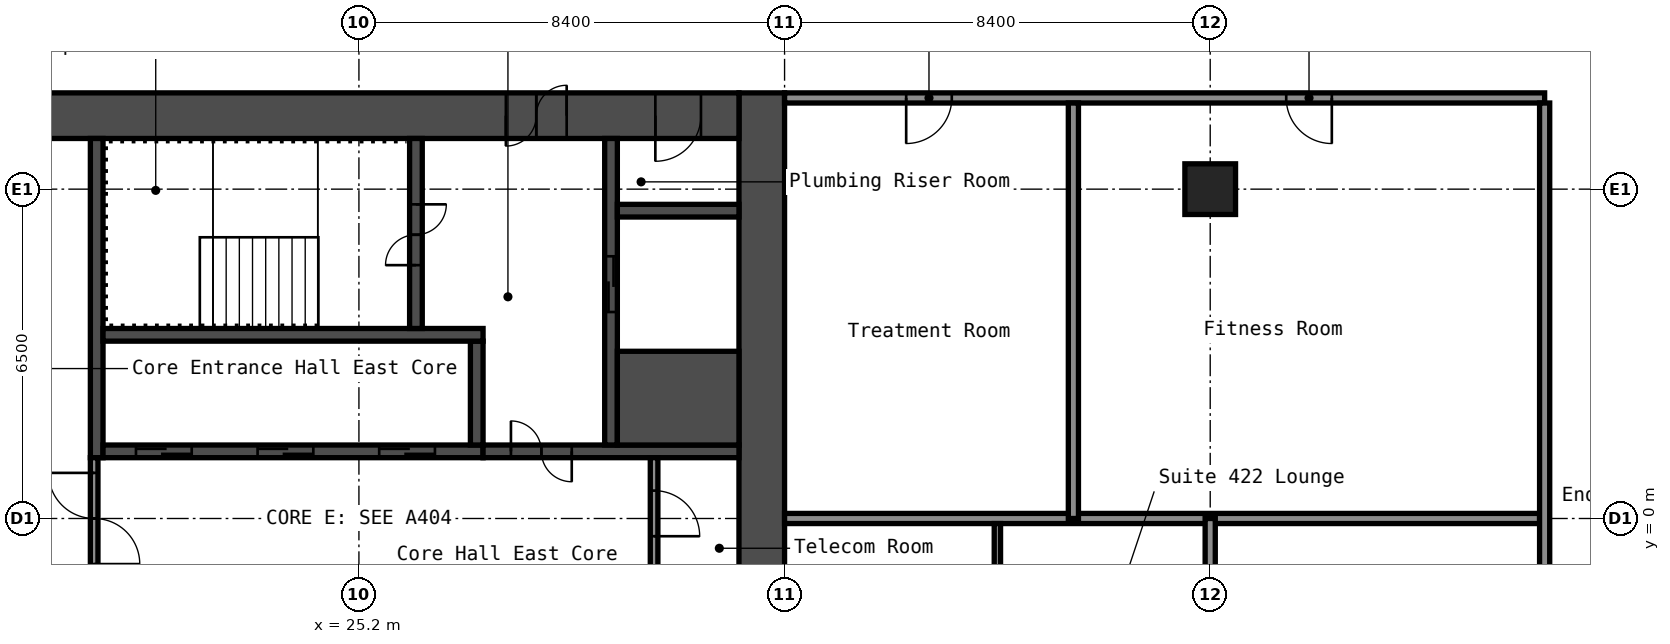
"""IFC4 building model, lengths in metres.
Left out: names, types, materials, properties, quantities, classifications, styles, units other than length and angle.
Written with IfcOpenShell. Run it as: python <this file> out.ifc"""

import sys

from ifc_helpers import new_model, si_unit, direction, frame, frame_2d, origin, origin_2d, place, context, subcontext, project, spatial, rectangle, hollow_rectangle, extrude, element, fill, save


model = new_model("IFC4")
c1 = context("Model", 3, precision=1e-05, world=origin(), true_north=direction((0.0, 1.0)))
c2 = subcontext(c1, "Body", "Model", "MODEL_VIEW")
j1 = project(units=[si_unit("LENGTHUNIT", "METRE"), si_unit("PLANEANGLEUNIT", "RADIAN")], contexts=[c1])
p1 = place(None, origin())
s1 = spatial("IfcSite", under=j1, at=p1, CompositionType="ELEMENT")
p2 = place(p1, origin())
s2 = spatial("IfcBuilding", under=s1, at=p2, CompositionType="ELEMENT")
p3 = place(p2, frame((0.0, 0.0, 19.8)))
s3 = spatial("IfcBuildingStorey", under=s2, at=p3, CompositionType="ELEMENT", Elevation=19.8)
p4 = place(p3, frame((42.0, 6.5, 0.0), z_axis=(0.0, 0.0, 1.0), x_axis=(1.0, 0.0, 0.0)))
e1 = element("IfcColumn", 1, at=p4, inside=s3, PredefinedType="COLUMN", context=c2, shape_type="SweptSolid", body=[
    extrude(hollow_rectangle(XDim=1.0, YDim=1.0, WallThickness=0.04, at=origin_2d()), origin(), (0.0, 0.0, 1.0), 2.8),
])
p5 = place(p3, frame((33.15, -8.4, 0.0), z_axis=(0.0, 0.0, 1.0), x_axis=(0.0, 1.0, 0.0)))
e2 = element("IfcWall", 2, at=p5, inside=s3, PredefinedType="SHEAR", context=c2, shape_type="SweptSolid", body=[
    extrude(rectangle(XDim=16.8, YDim=0.9, at=frame_2d((8.4, 0.0))), origin(), (0.0, 0.0, 1.0), 2.8),
])
p6 = place(p3, frame((17.7, 7.95, 0.0), z_axis=(0.0, 0.0, 1.0), x_axis=(1.0, 0.0, 0.0)))
e3 = element("IfcWall", 3, at=p6, inside=s3, PredefinedType="SHEAR", context=c2, shape_type="SweptSolid", body=[
    extrude(rectangle(XDim=15.0, YDim=0.9, at=frame_2d((7.5, 0.0))), origin(), (0.0, 0.0, 1.0), 2.8),
])
p7 = place(p6, frame((10.4, 0.0, 0.0)))
e4 = element("IfcOpeningElement", 4, at=p7, cuts=e3, PredefinedType="OPENING", context=c2, shape_type="SweptSolid", body=[
    extrude(rectangle(XDim=1.2, YDim=2.1, at=frame_2d((0.6, 1.05))), frame((0.0, 0.46, 0.0), z_axis=(0.0, -1.0, 0.0), x_axis=(1.0, 0.0, 0.0)), (0.0, 0.0, 1.0), 0.92),
])
p8 = place(p6, frame((13.35, 0.0, 0.0)))
e5 = element("IfcOpeningElement", 5, at=p8, cuts=e3, PredefinedType="OPENING", context=c2, shape_type="SweptSolid", body=[
    extrude(rectangle(XDim=0.9, YDim=2.1, at=frame_2d((0.45, 1.05))), frame((0.0, 0.46, 0.0), z_axis=(0.0, -1.0, 0.0), x_axis=(1.0, 0.0, 0.0)), (0.0, 0.0, 1.0), 0.92),
])
p9 = place(p3, frame((20.025, 1.2, 0.0), z_axis=(0.0, 0.0, 1.0), x_axis=(0.0, 1.0, 0.0)))
e6 = element("IfcWall", 6, at=p9, inside=s3, PredefinedType="SHEAR", context=c2, shape_type="SweptSolid", body=[
    extrude(rectangle(XDim=6.3, YDim=0.25, at=frame_2d((3.15, 0.0))), origin(), (0.0, 0.0, 1.0), 2.8),
])
p10 = place(p3, frame((20.15, 1.325, 0.0), z_axis=(0.0, 0.0, 1.0), x_axis=(1.0, 0.0, 0.0)))
e7 = element("IfcWall", 7, at=p10, inside=s3, PredefinedType="SHEAR", context=c2, shape_type="SweptSolid", body=[
    extrude(rectangle(XDim=7.5, YDim=0.25, at=frame_2d((3.75, 0.0))), origin(), (0.0, 0.0, 1.0), 2.8),
])
p11 = place(p10, frame((0.65, 0.0, 0.0)))
e8 = element("IfcOpeningElement", 8, at=p11, cuts=e7, PredefinedType="OPENING", context=c2, shape_type="SweptSolid", body=[
    extrude(rectangle(XDim=1.1, YDim=2.1, at=frame_2d((0.55, 1.05))), frame((0.0, 0.135, 0.0), z_axis=(0.0, -1.0, 0.0), x_axis=(1.0, 0.0, 0.0)), (0.0, 0.0, 1.0), 0.27),
])
p12 = place(p10, frame((3.05, 0.0, 0.0)))
e9 = element("IfcOpeningElement", 9, at=p12, cuts=e7, PredefinedType="OPENING", context=c2, shape_type="SweptSolid", body=[
    extrude(rectangle(XDim=1.1, YDim=2.1, at=frame_2d((0.55, 1.05))), frame((0.0, 0.135, 0.0), z_axis=(0.0, -1.0, 0.0), x_axis=(1.0, 0.0, 0.0)), (0.0, 0.0, 1.0), 0.27),
])
p13 = place(p10, frame((5.45, 0.0, 0.0)))
e10 = element("IfcOpeningElement", 10, at=p13, cuts=e7, PredefinedType="OPENING", context=c2, shape_type="SweptSolid", body=[
    extrude(rectangle(XDim=1.1, YDim=2.1, at=frame_2d((0.55, 1.05))), frame((0.0, 0.135, 0.0), z_axis=(0.0, -1.0, 0.0), x_axis=(1.0, 0.0, 0.0)), (0.0, 0.0, 1.0), 0.27),
])
p14 = place(p3, frame((27.525, 1.45, 0.0), z_axis=(0.0, 0.0, 1.0), x_axis=(0.0, 1.0, 0.0)))
e11 = element("IfcWall", 11, at=p14, inside=s3, PredefinedType="SHEAR", context=c2, shape_type="SweptSolid", body=[
    extrude(rectangle(XDim=2.05, YDim=0.25, at=frame_2d((1.025, 0.0))), origin(), (0.0, 0.0, 1.0), 2.8),
])
p15 = place(p3, frame((20.15, 3.625, 0.0), z_axis=(0.0, 0.0, 1.0), x_axis=(1.0, 0.0, 0.0)))
e12 = element("IfcWall", 12, at=p15, inside=s3, PredefinedType="SHEAR", context=c2, shape_type="SweptSolid", body=[
    extrude(rectangle(XDim=7.5, YDim=0.25, at=frame_2d((3.75, 0.0))), origin(), (0.0, 0.0, 1.0), 2.8),
])
p16 = place(p3, frame((26.325, 3.75, 0.0), z_axis=(0.0, 0.0, 1.0), x_axis=(0.0, 1.0, 0.0)))
e13 = element("IfcWall", 13, at=p16, inside=s3, PredefinedType="SHEAR", context=c2, shape_type="SweptSolid", body=[
    extrude(rectangle(XDim=3.75, YDim=0.25, at=frame_2d((1.875, 0.0))), origin(), (0.0, 0.0, 1.0), 2.8),
])
p17 = place(p16, frame((1.25, 0.0, 0.0)))
e14 = element("IfcOpeningElement", 14, at=p17, cuts=e13, PredefinedType="OPENING", context=c2, shape_type="SweptSolid", body=[
    extrude(rectangle(XDim=1.2, YDim=2.1, at=frame_2d((0.6, 1.05))), frame((0.0, 0.135, 0.0), z_axis=(0.0, -1.0, 0.0), x_axis=(1.0, 0.0, 0.0)), (0.0, 0.0, 1.0), 0.27),
])
p18 = place(p3, frame((27.65, 1.325, 0.0), z_axis=(0.0, 0.0, 1.0), x_axis=(1.0, 0.0, 0.0)))
e15 = element("IfcWall", 15, at=p18, inside=s3, PredefinedType="SHEAR", context=c2, shape_type="SweptSolid", body=[
    extrude(rectangle(XDim=5.05, YDim=0.25, at=frame_2d((2.525, 0.0))), origin(), (0.0, 0.0, 1.0), 2.8),
])
p19 = place(p18, frame((0.55, 0.0, 0.0)))
e16 = element("IfcOpeningElement", 16, at=p19, cuts=e15, PredefinedType="OPENING", context=c2, shape_type="SweptSolid", body=[
    extrude(rectangle(XDim=1.2, YDim=2.1, at=frame_2d((0.6, 1.05))), frame((0.0, 0.135, 0.0), z_axis=(0.0, -1.0, 0.0), x_axis=(1.0, 0.0, 0.0)), (0.0, 0.0, 1.0), 0.27),
])
p20 = place(p3, frame((30.175, 1.45, 0.0), z_axis=(0.0, 0.0, 1.0), x_axis=(0.0, 1.0, 0.0)))
e17 = element("IfcWall", 17, at=p20, inside=s3, PredefinedType="SHEAR", context=c2, shape_type="SweptSolid", body=[
    extrude(rectangle(XDim=6.05, YDim=0.25, at=frame_2d((3.025, 0.0))), origin(), (0.0, 0.0, 1.0), 2.8),
])
p21 = place(p20, frame((2.625, 0.0, 0.0)))
e18 = element("IfcOpeningElement", 18, at=p21, cuts=e17, PredefinedType="OPENING", context=c2, shape_type="SweptSolid", body=[
    extrude(rectangle(XDim=1.1, YDim=2.1, at=frame_2d((0.55, 1.05))), frame((0.0, 0.135, 0.0), z_axis=(0.0, -1.0, 0.0), x_axis=(1.0, 0.0, 0.0)), (0.0, 0.0, 1.0), 0.27),
])
p22 = place(p3, frame((30.3, 2.375, 0.0), z_axis=(0.0, 0.0, 1.0), x_axis=(1.0, 0.0, 0.0)))
e19 = element("IfcWall", 19, at=p22, inside=s3, PredefinedType="SHEAR", context=c2, shape_type="SweptSolid", body=[
    extrude(rectangle(XDim=2.4, YDim=1.85, at=frame_2d((1.2, 0.0))), origin(), (0.0, 0.0, 1.0), 2.8),
])
p23 = place(p3, frame((30.3, 6.075, 0.0), z_axis=(0.0, 0.0, 1.0), x_axis=(1.0, 0.0, 0.0)))
e20 = element("IfcWall", 20, at=p23, inside=s3, PredefinedType="SHEAR", context=c2, shape_type="SweptSolid", body=[
    extrude(rectangle(XDim=2.4, YDim=0.25, at=frame_2d((1.2, 0.0))), origin(), (0.0, 0.0, 1.0), 2.8),
])
p24 = place(p3, frame((19.975, -1.2, 0.0), z_axis=(0.0, 0.0, 1.0), x_axis=(0.0, 1.0, 0.0)))
e21 = element("IfcWall", 21, at=p24, inside=s3, PredefinedType="PARTITIONING", context=c2, shape_type="SweptSolid", body=[
    extrude(rectangle(XDim=2.4, YDim=0.15, at=frame_2d((1.2, 0.0))), origin(), (0.0, 0.0, 1.0), 2.8),
])
p25 = place(p24, frame((0.3, 0.0, 0.0)))
e22 = element("IfcOpeningElement", 22, at=p25, cuts=e21, PredefinedType="OPENING", context=c2, shape_type="SweptSolid", body=[
    extrude(rectangle(XDim=1.8, YDim=2.1, at=frame_2d((0.9, 1.05))), frame((0.0, 0.085, 0.0), z_axis=(0.0, -1.0, 0.0), x_axis=(1.0, 0.0, 0.0)), (0.0, 0.0, 1.0), 0.17),
])
p26 = place(p3, frame((31.025, -1.15, 0.0), z_axis=(0.0, 0.0, 1.0), x_axis=(0.0, 1.0, 0.0)))
e23 = element("IfcWall", 23, at=p26, inside=s3, PredefinedType="PARTITIONING", context=c2, shape_type="SweptSolid", body=[
    extrude(rectangle(XDim=2.35, YDim=0.15, at=frame_2d((1.175, 0.0))), origin(), (0.0, 0.0, 1.0), 2.8),
])
p27 = place(p26, frame((0.8, 0.0, 0.0)))
e24 = element("IfcOpeningElement", 24, at=p27, cuts=e23, PredefinedType="OPENING", context=c2, shape_type="SweptSolid", body=[
    extrude(rectangle(XDim=0.9, YDim=2.1, at=frame_2d((0.45, 1.05))), frame((0.0, 0.085, 0.0), z_axis=(0.0, -1.0, 0.0), x_axis=(1.0, 0.0, 0.0)), (0.0, 0.0, 1.0), 0.17),
])
p28 = place(p3, frame((33.6, 0.0, 0.0), z_axis=(0.0, 0.0, 1.0), x_axis=(1.0, 0.0, 0.0)))
e25 = element("IfcWall", 25, at=p28, inside=s3, PredefinedType="PARTITIONING", context=c2, shape_type="SweptSolid", body=[
    extrude(rectangle(XDim=14.9, YDim=0.2, at=frame_2d((7.45, 0.0))), origin(), (0.0, 0.0, 1.0), 2.8),
])
p29 = place(p3, frame((33.6, 8.3, 0.0), z_axis=(0.0, 0.0, 1.0), x_axis=(1.0, 0.0, 0.0)))
e26 = element("IfcWall", 26, at=p29, inside=s3, PredefinedType="PARTITIONING", context=c2, shape_type="SweptSolid", body=[
    extrude(rectangle(XDim=15.0, YDim=0.2, at=frame_2d((7.5, 0.0))), origin(), (0.0, 0.0, 1.0), 2.8),
])
p30 = place(p29, frame((2.4, 0.0, 0.0)))
e27 = element("IfcOpeningElement", 27, at=p30, cuts=e26, PredefinedType="OPENING", context=c2, shape_type="SweptSolid", body=[
    extrude(rectangle(XDim=0.9, YDim=2.1, at=frame_2d((0.45, 1.05))), frame((0.0, 0.11, 0.0), z_axis=(0.0, -1.0, 0.0), x_axis=(1.0, 0.0, 0.0)), (0.0, 0.0, 1.0), 0.22),
])
p31 = place(p29, frame((9.9, 0.0, 0.0)))
e28 = element("IfcOpeningElement", 28, at=p31, cuts=e26, PredefinedType="OPENING", context=c2, shape_type="SweptSolid", body=[
    extrude(rectangle(XDim=0.9, YDim=2.1, at=frame_2d((0.45, 1.05))), frame((0.0, 0.11, 0.0), z_axis=(0.0, -1.0, 0.0), x_axis=(1.0, 0.0, 0.0)), (0.0, 0.0, 1.0), 0.22),
])
p32 = place(p3, frame((37.8, -8.2, 0.0), z_axis=(0.0, 0.0, 1.0), x_axis=(0.0, 1.0, 0.0)))
e29 = element("IfcWall", 29, at=p32, inside=s3, PredefinedType="PARTITIONING", context=c2, shape_type="SweptSolid", body=[
    extrude(rectangle(XDim=8.1, YDim=0.125, at=frame_2d((4.05, 0.0))), origin(), (0.0, 0.0, 1.0), 2.8),
])
p33 = place(p32, frame((4.05, 0.0, 0.0)))
e30 = element("IfcOpeningElement", 30, at=p33, cuts=e29, PredefinedType="OPENING", context=c2, shape_type="SweptSolid", body=[
    extrude(rectangle(XDim=0.9, YDim=2.1, at=frame_2d((0.45, 1.05))), frame((0.0, 0.073, 0.0), z_axis=(0.0, -1.0, 0.0), x_axis=(1.0, 0.0, 0.0)), (0.0, 0.0, 1.0), 0.145),
])
for number, where, z_axis, x_axis in (
    (31, (39.3, 0.0, 0.0), (0.0, 0.0, 1.0), (0.0, 1.0, 0.0)),
    (32, (42.0, -8.2, 0.0), (0.0, 0.0, 1.0), (0.0, 1.0, 0.0)),
):
    element("IfcWall", number, at=place(p3, frame(where, z_axis=z_axis, x_axis=x_axis)), inside=s3, PredefinedType="PARTITIONING", context=c2, shape_type="SweptSolid", body=[
        extrude(rectangle(XDim=8.2, YDim=0.2, at=frame_2d((4.1, 0.0))), origin(), (0.0, 0.0, 1.0), 2.8),
    ])
p34 = place(p3, frame((48.6, -8.2, 0.0), z_axis=(0.0, 0.0, 1.0), x_axis=(0.0, 1.0, 0.0)))
e33 = element("IfcWall", 33, at=p34, inside=s3, PredefinedType="PARTITIONING", context=c2, shape_type="SweptSolid", body=[
    extrude(rectangle(XDim=16.4, YDim=0.2, at=frame_2d((8.2, 0.0))), origin(), (0.0, 0.0, 1.0), 2.8),
])
p35 = place(p7, origin())
e34 = element("IfcDoor", 34, at=p35, inside=s3, OperationType="DOUBLE_DOOR_SINGLE_SWING", PredefinedType="DOOR", context=c2, shape_type="SweptSolid", body=[
    extrude(rectangle(XDim=1.2, YDim=2.1, at=frame_2d((0.6, 1.05))), frame((0.0, 0.025, 0.0), z_axis=(0.0, -1.0, 0.0), x_axis=(1.0, 0.0, 0.0)), (0.0, 0.0, 1.0), 0.05),
])
fill(e4, e34)
p36 = place(p8, origin())
e35 = element("IfcDoor", 35, at=p36, inside=s3, OperationType="SINGLE_SWING_LEFT", PredefinedType="DOOR", context=c2, shape_type="SweptSolid", body=[
    extrude(rectangle(XDim=0.9, YDim=2.1, at=frame_2d((0.45, 1.05))), frame((0.0, 0.025, 0.0), z_axis=(0.0, -1.0, 0.0), x_axis=(1.0, 0.0, 0.0)), (0.0, 0.0, 1.0), 0.05),
])
fill(e5, e35)
p37 = place(p17, origin())
e36 = element("IfcDoor", 36, at=p37, inside=s3, OperationType="DOUBLE_DOOR_SINGLE_SWING", PredefinedType="DOOR", context=c2, shape_type="SweptSolid", body=[
    extrude(rectangle(XDim=1.2, YDim=2.1, at=frame_2d((0.6, 1.05))), frame((0.0, 0.025, 0.0), z_axis=(0.0, -1.0, 0.0), x_axis=(1.0, 0.0, 0.0)), (0.0, 0.0, 1.0), 0.05),
])
fill(e14, e36)
p38 = place(p19, origin())
e37 = element("IfcDoor", 37, at=p38, inside=s3, OperationType="DOUBLE_DOOR_SINGLE_SWING", PredefinedType="DOOR", context=c2, shape_type="SweptSolid", body=[
    extrude(rectangle(XDim=1.2, YDim=2.1, at=frame_2d((0.6, 1.05))), frame((0.0, 0.025, 0.0), z_axis=(0.0, -1.0, 0.0), x_axis=(1.0, 0.0, 0.0)), (0.0, 0.0, 1.0), 0.05),
])
fill(e16, e37)
p39 = place(p25, origin())
e38 = element("IfcDoor", 38, at=p39, inside=s3, OperationType="DOUBLE_DOOR_SINGLE_SWING", PredefinedType="DOOR", context=c2, shape_type="SweptSolid", body=[
    extrude(rectangle(XDim=1.8, YDim=2.1, at=frame_2d((0.9, 1.05))), frame((0.0, 0.025, 0.0), z_axis=(0.0, -1.0, 0.0), x_axis=(1.0, 0.0, 0.0)), (0.0, 0.0, 1.0), 0.05),
])
fill(e22, e38)
p40 = place(p27, origin())
e39 = element("IfcDoor", 39, at=p40, inside=s3, OperationType="SINGLE_SWING_LEFT", PredefinedType="DOOR", context=c2, shape_type="SweptSolid", body=[
    extrude(rectangle(XDim=0.9, YDim=2.1, at=frame_2d((0.45, 1.05))), frame((0.0, 0.025, 0.0), z_axis=(0.0, -1.0, 0.0), x_axis=(1.0, 0.0, 0.0)), (0.0, 0.0, 1.0), 0.05),
])
fill(e24, e39)
p41 = place(p11, origin())
e40 = element("IfcDoor", 40, at=p41, inside=s3, OperationType="DOUBLE_DOOR_SLIDING", PredefinedType="DOOR", context=c2, shape_type="SweptSolid", body=[
    extrude(rectangle(XDim=1.1, YDim=2.1, at=frame_2d((0.55, 1.05))), frame((0.0, 0.025, 0.0), z_axis=(0.0, -1.0, 0.0), x_axis=(1.0, 0.0, 0.0)), (0.0, 0.0, 1.0), 0.05),
])
fill(e8, e40)
p42 = place(p12, origin())
e41 = element("IfcDoor", 41, at=p42, inside=s3, OperationType="DOUBLE_DOOR_SLIDING", PredefinedType="DOOR", context=c2, shape_type="SweptSolid", body=[
    extrude(rectangle(XDim=1.1, YDim=2.1, at=frame_2d((0.55, 1.05))), frame((0.0, 0.025, 0.0), z_axis=(0.0, -1.0, 0.0), x_axis=(1.0, 0.0, 0.0)), (0.0, 0.0, 1.0), 0.05),
])
fill(e9, e41)
p43 = place(p13, origin())
e42 = element("IfcDoor", 42, at=p43, inside=s3, OperationType="DOUBLE_DOOR_SLIDING", PredefinedType="DOOR", context=c2, shape_type="SweptSolid", body=[
    extrude(rectangle(XDim=1.1, YDim=2.1, at=frame_2d((0.55, 1.05))), frame((0.0, 0.025, 0.0), z_axis=(0.0, -1.0, 0.0), x_axis=(1.0, 0.0, 0.0)), (0.0, 0.0, 1.0), 0.05),
])
fill(e10, e42)
p44 = place(p21, origin())
e43 = element("IfcDoor", 43, at=p44, inside=s3, OperationType="DOUBLE_DOOR_SLIDING", PredefinedType="DOOR", context=c2, shape_type="SweptSolid", body=[
    extrude(rectangle(XDim=1.1, YDim=2.1, at=frame_2d((0.55, 1.05))), frame((0.0, 0.025, 0.0), z_axis=(0.0, -1.0, 0.0), x_axis=(1.0, 0.0, 0.0)), (0.0, 0.0, 1.0), 0.05),
])
fill(e18, e43)
p45 = place(p30, origin())
e44 = element("IfcDoor", 44, at=p45, inside=s3, OperationType="SINGLE_SWING_LEFT", PredefinedType="DOOR", context=c2, shape_type="SweptSolid", body=[
    extrude(rectangle(XDim=0.9, YDim=2.1, at=frame_2d((0.45, 1.05))), frame((0.0, 0.025, 0.0), z_axis=(0.0, -1.0, 0.0), x_axis=(1.0, 0.0, 0.0)), (0.0, 0.0, 1.0), 0.05),
])
fill(e27, e44)
p46 = place(p31, origin())
e45 = element("IfcDoor", 45, at=p46, inside=s3, OperationType="SINGLE_SWING_RIGHT", PredefinedType="DOOR", context=c2, shape_type="SweptSolid", body=[
    extrude(rectangle(XDim=0.9, YDim=2.1, at=frame_2d((0.45, 1.05))), frame((0.0, 0.025, 0.0), z_axis=(0.0, -1.0, 0.0), x_axis=(1.0, 0.0, 0.0)), (0.0, 0.0, 1.0), 0.05),
])
fill(e28, e45)
save(model, sys.argv[1])
